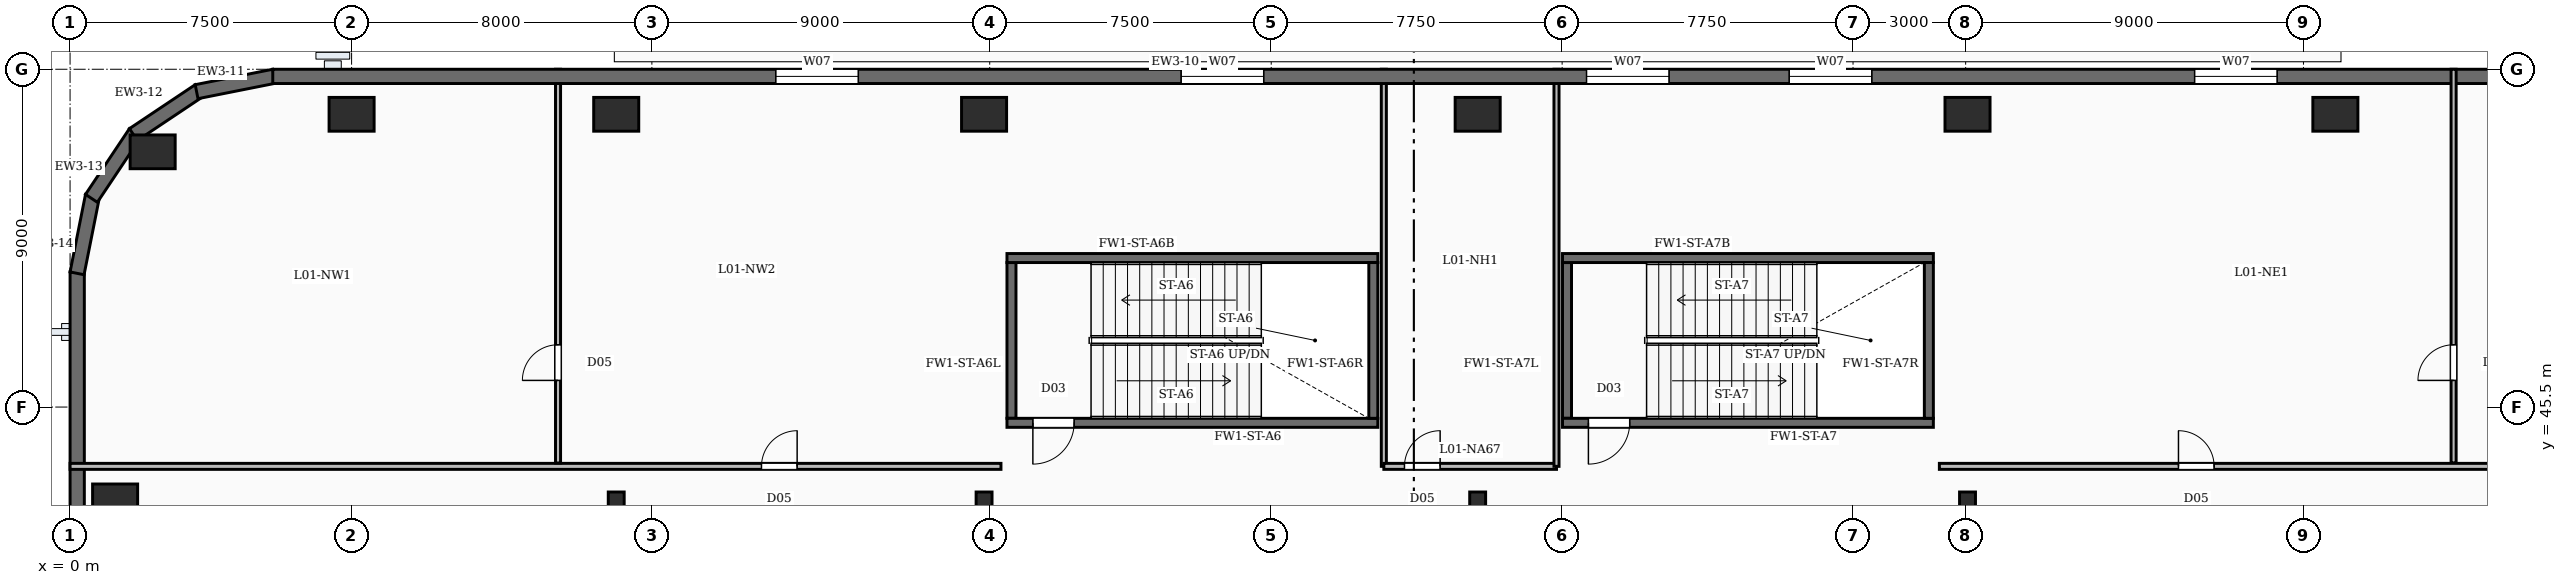
"""IFC4 building model, lengths in metres.
Left out: names, types, materials, properties, quantities, classifications, styles, units other than length and angle.
Written with IfcOpenShell. Run it as: python <this file> out.ifc"""

import sys

from ifc_helpers import new_model, si_unit, direction, frame, frame_2d, origin, origin_2d, place, context, subcontext, project, spatial, rectangle, i_section, extrude, element, fill, save


model = new_model("IFC4")
c1 = context("Model", 3, precision=1e-05, world=origin(), true_north=direction((0.0, 1.0)))
c2 = subcontext(c1, "Body", "Model", "MODEL_VIEW")
j1 = project(units=[si_unit("LENGTHUNIT", "METRE"), si_unit("PLANEANGLEUNIT", "RADIAN")], contexts=[c1])
p1 = place(None, origin())
s1 = spatial("IfcSite", under=j1, at=p1, CompositionType="ELEMENT")
p2 = place(p1, origin())
s2 = spatial("IfcBuilding", under=s1, at=p2, CompositionType="ELEMENT")
p3 = place(p2, frame((0.0, 0.0, 8.0)))
s3 = spatial("IfcBuildingStorey", under=s2, at=p3, CompositionType="ELEMENT", Elevation=8.0)
for number, where, z_axis, x_axis in (
    (1, (60.35, 53.3, -0.35), (0.0, 0.0, 1.0), (1.0, 0.0, 0.0)),
    (2, (50.55, 53.3, -0.35), (0.0, 0.0, 1.0), (1.0, 0.0, 0.0)),
    (3, (37.5, 53.3, -0.35), (0.0, 0.0, 1.0), (1.0, 0.0, 0.0)),
    (4, (24.35, 53.3, -0.35), (0.0, 0.0, 1.0), (1.0, 0.0, 0.0)),
    (5, (14.55, 53.3, -0.35), (0.0, 0.0, 1.0), (1.0, 0.0, 0.0)),
    (6, (7.5, 53.3, -0.35), (0.0, 0.0, 1.0), (1.0, 0.0, 0.0)),
    (7, (2.2, 52.3, -0.35), (0.0, 0.0, 1.0), (1.0, 0.0, 0.0)),
    (8, (1.2, 43.0, -0.35), (0.0, 0.0, 1.0), (1.0, 0.0, 0.0)),
):
    element("IfcColumn", number, at=place(p3, frame(where, z_axis=z_axis, x_axis=x_axis)), inside=s3, PredefinedType="COLUMN", context=c2, shape_type="SweptSolid", body=[
        extrude(rectangle(XDim=1.2, YDim=0.9, at=origin_2d()), origin(), (0.0, 0.0, 1.0), 5.0),
    ])
for number, where, z_axis, x_axis in (
    (9, (14.55, 43.0, -0.35), (0.0, 0.0, 1.0), (1.0, 0.0, 0.0)),
    (10, (24.35, 43.0, -0.35), (0.0, 0.0, 1.0), (1.0, 0.0, 0.0)),
    (11, (37.5, 43.0, -0.35), (0.0, 0.0, 1.0), (1.0, 0.0, 0.0)),
    (12, (50.55, 43.0, -0.35), (0.0, 0.0, 1.0), (1.0, 0.0, 0.0)),
):
    element("IfcColumn", number, at=place(p3, frame(where, z_axis=z_axis, x_axis=x_axis)), inside=s3, PredefinedType="COLUMN", context=c2, shape_type="SweptSolid", body=[
        extrude(i_section(OverallWidth=0.424, OverallDepth=0.474, WebThickness=0.048, FlangeThickness=0.077, FilletRadius=0.02, at=origin_2d()), origin(), (0.0, 0.0, 1.0), 5.0),
    ])
p4 = place(p3, frame((5.4, 54.31, 0.0), z_axis=(0.0, 0.0, 1.0), x_axis=(1.0, 0.0, 0.0)))
e13 = element("IfcWall", 13, at=p4, inside=s3, PredefinedType="SOLIDWALL", context=c2, shape_type="SweptSolid", body=[
    extrude(rectangle(XDim=68.7, YDim=0.38, at=frame_2d((34.35, 0.0))), origin(), (0.0, 0.0, 1.0), 4.65),
])
p5 = place(p4, frame((13.4, 0.0, 0.95)))
e14 = element("IfcOpeningElement", 14, at=p5, cuts=e13, PredefinedType="OPENING", context=c2, shape_type="SweptSolid", body=[
    extrude(rectangle(XDim=2.2, YDim=2.5, at=frame_2d((1.1, 1.25))), frame((0.0, 0.2, 0.0), z_axis=(0.0, -1.0, 0.0), x_axis=(1.0, 0.0, 0.0)), (0.0, 0.0, 1.0), 0.4),
])
p6 = place(p4, frame((24.2, 0.0, 0.95)))
e15 = element("IfcOpeningElement", 15, at=p6, cuts=e13, PredefinedType="OPENING", context=c2, shape_type="SweptSolid", body=[
    extrude(rectangle(XDim=2.2, YDim=2.5, at=frame_2d((1.1, 1.25))), frame((0.0, 0.2, 0.0), z_axis=(0.0, -1.0, 0.0), x_axis=(1.0, 0.0, 0.0)), (0.0, 0.0, 1.0), 0.4),
])
p7 = place(p4, frame((35.0, 0.0, 0.95)))
e16 = element("IfcOpeningElement", 16, at=p7, cuts=e13, PredefinedType="OPENING", context=c2, shape_type="SweptSolid", body=[
    extrude(rectangle(XDim=2.2, YDim=2.5, at=frame_2d((1.1, 1.25))), frame((0.0, 0.2, 0.0), z_axis=(0.0, -1.0, 0.0), x_axis=(1.0, 0.0, 0.0)), (0.0, 0.0, 1.0), 0.4),
])
p8 = place(p4, frame((40.4, 0.0, 0.95)))
e17 = element("IfcOpeningElement", 17, at=p8, cuts=e13, PredefinedType="OPENING", context=c2, shape_type="SweptSolid", body=[
    extrude(rectangle(XDim=2.2, YDim=2.5, at=frame_2d((1.1, 1.25))), frame((0.0, 0.2, 0.0), z_axis=(0.0, -1.0, 0.0), x_axis=(1.0, 0.0, 0.0)), (0.0, 0.0, 1.0), 0.4),
])
p9 = place(p4, frame((51.2, 0.0, 0.95)))
e18 = element("IfcOpeningElement", 18, at=p9, cuts=e13, PredefinedType="OPENING", context=c2, shape_type="SweptSolid", body=[
    extrude(rectangle(XDim=2.2, YDim=2.5, at=frame_2d((1.1, 1.25))), frame((0.0, 0.2, 0.0), z_axis=(0.0, -1.0, 0.0), x_axis=(1.0, 0.0, 0.0)), (0.0, 0.0, 1.0), 0.4),
])
p10 = place(p4, frame((62.0, 0.0, 0.95)))
e19 = element("IfcOpeningElement", 19, at=p10, cuts=e13, PredefinedType="OPENING", context=c2, shape_type="SweptSolid", body=[
    extrude(rectangle(XDim=2.2, YDim=2.5, at=frame_2d((1.1, 1.25))), frame((0.0, 0.2, 0.0), z_axis=(0.0, -1.0, 0.0), x_axis=(1.0, 0.0, 0.0)), (0.0, 0.0, 1.0), 0.4),
])
for number, where, z_axis, x_axis in (
    (20, (3.371, 53.903, 0.0), (0.0, 0.0, 1.0), (0.981, 0.195, 0.0)),
    (21, (1.687, 52.76, 0.0), (0.0, 0.0, 1.0), (0.832, 0.556, 0.0)),
    (22, (0.569, 51.061, 0.0), (0.0, 0.0, 1.0), (0.556, 0.832, 0.0)),
    (23, (0.186, 49.063, 0.0), (0.0, 0.0, 1.0), (0.195, 0.981, 0.0)),
):
    element("IfcWall", number, at=place(p3, frame(where, z_axis=z_axis, x_axis=x_axis)), inside=s3, PredefinedType="SOLIDWALL", context=c2, shape_type="SweptSolid", body=[
        extrude(rectangle(XDim=2.107, YDim=0.38, at=frame_2d((1.053, 0.0))), origin(), (0.0, 0.0, 1.0), 4.65),
    ])
p11 = place(p3, frame((0.19, 5.4, 0.0), z_axis=(0.0, 0.0, 1.0), x_axis=(0.0, 1.0, 0.0)))
e24 = element("IfcWall", 24, at=p11, inside=s3, PredefinedType="SOLIDWALL", context=c2, shape_type="SweptSolid", body=[
    extrude(rectangle(XDim=43.7, YDim=0.38, at=frame_2d((21.85, 0.0))), origin(), (0.0, 0.0, 1.0), 4.65),
])
p12 = place(p11, frame((2.6, 0.0, 0.95)))
e25 = element("IfcOpeningElement", 25, at=p12, cuts=e24, PredefinedType="OPENING", context=c2, shape_type="SweptSolid", body=[
    extrude(rectangle(XDim=2.2, YDim=2.5, at=frame_2d((1.1, 1.25))), frame((0.0, 0.2, 0.0), z_axis=(0.0, -1.0, 0.0), x_axis=(1.0, 0.0, 0.0)), (0.0, 0.0, 1.0), 0.4),
])
p13 = place(p11, frame((8.0, 0.0, 0.95)))
e26 = element("IfcOpeningElement", 26, at=p13, cuts=e24, PredefinedType="OPENING", context=c2, shape_type="SweptSolid", body=[
    extrude(rectangle(XDim=2.2, YDim=2.5, at=frame_2d((1.1, 1.25))), frame((0.0, 0.2, 0.0), z_axis=(0.0, -1.0, 0.0), x_axis=(1.0, 0.0, 0.0)), (0.0, 0.0, 1.0), 0.4),
])
p14 = place(p11, frame((24.2, 0.0, 0.95)))
e27 = element("IfcOpeningElement", 27, at=p14, cuts=e24, PredefinedType="OPENING", context=c2, shape_type="SweptSolid", body=[
    extrude(rectangle(XDim=2.2, YDim=2.5, at=frame_2d((1.1, 1.25))), frame((0.0, 0.2, 0.0), z_axis=(0.0, -1.0, 0.0), x_axis=(1.0, 0.0, 0.0)), (0.0, 0.0, 1.0), 0.4),
])
p15 = place(p11, frame((29.6, 0.0, 0.95)))
e28 = element("IfcOpeningElement", 28, at=p15, cuts=e24, PredefinedType="OPENING", context=c2, shape_type="SweptSolid", body=[
    extrude(rectangle(XDim=2.2, YDim=2.5, at=frame_2d((1.1, 1.25))), frame((0.0, 0.2, 0.0), z_axis=(0.0, -1.0, 0.0), x_axis=(1.0, 0.0, 0.0)), (0.0, 0.0, 1.0), 0.4),
])
p16 = place(p3, frame((34.84, 45.08, 0.0), z_axis=(0.0, 0.0, 1.0), x_axis=(-1.0, 0.0, 0.0)))
e29 = element("IfcWall", 29, at=p16, inside=s3, PredefinedType="SOLIDWALL", context=c2, shape_type="SweptSolid", body=[
    extrude(rectangle(XDim=9.88, YDim=0.24, at=frame_2d((4.94, 0.0))), origin(), (0.0, 0.0, 1.0), 4.65),
])
p17 = place(p16, frame((8.09, 0.0, 0.0)))
e30 = element("IfcOpeningElement", 30, at=p17, cuts=e29, PredefinedType="OPENING", context=c2, shape_type="SweptSolid", body=[
    extrude(rectangle(XDim=1.1, YDim=2.15, at=frame_2d((0.55, 1.075))), frame((0.0, 0.13, 0.0), z_axis=(0.0, -1.0, 0.0), x_axis=(1.0, 0.0, 0.0)), (0.0, 0.0, 1.0), 0.26),
])
p18 = place(p3, frame((24.96, 49.47, 0.0), z_axis=(0.0, 0.0, 1.0), x_axis=(1.0, 0.0, 0.0)))
e31 = element("IfcWall", 31, at=p18, inside=s3, PredefinedType="SOLIDWALL", context=c2, shape_type="SweptSolid", body=[
    extrude(rectangle(XDim=9.88, YDim=0.24, at=frame_2d((4.94, 0.0))), origin(), (0.0, 0.0, 1.0), 4.65),
])
for number, where, z_axis, x_axis in (
    (32, (25.08, 45.2, 0.0), (0.0, 0.0, 1.0), (0.0, 1.0, 0.0)),
    (33, (34.72, 45.2, 0.0), (0.0, 0.0, 1.0), (0.0, 1.0, 0.0)),
):
    element("IfcWall", number, at=place(p3, frame(where, z_axis=z_axis, x_axis=x_axis)), inside=s3, PredefinedType="SOLIDWALL", context=c2, shape_type="SweptSolid", body=[
        extrude(rectangle(XDim=4.15, YDim=0.24, at=frame_2d((2.075, 0.0))), origin(), (0.0, 0.0, 1.0), 4.65),
    ])
p19 = place(p3, frame((49.64, 45.08, 0.0), z_axis=(0.0, 0.0, 1.0), x_axis=(-1.0, 0.0, 0.0)))
e34 = element("IfcWall", 34, at=p19, inside=s3, PredefinedType="SOLIDWALL", context=c2, shape_type="SweptSolid", body=[
    extrude(rectangle(XDim=9.88, YDim=0.24, at=frame_2d((4.94, 0.0))), origin(), (0.0, 0.0, 1.0), 4.65),
])
p20 = place(p19, frame((8.09, 0.0, 0.0)))
e35 = element("IfcOpeningElement", 35, at=p20, cuts=e34, PredefinedType="OPENING", context=c2, shape_type="SweptSolid", body=[
    extrude(rectangle(XDim=1.1, YDim=2.15, at=frame_2d((0.55, 1.075))), frame((0.0, 0.13, 0.0), z_axis=(0.0, -1.0, 0.0), x_axis=(1.0, 0.0, 0.0)), (0.0, 0.0, 1.0), 0.26),
])
p21 = place(p3, frame((39.76, 49.47, 0.0), z_axis=(0.0, 0.0, 1.0), x_axis=(1.0, 0.0, 0.0)))
e36 = element("IfcWall", 36, at=p21, inside=s3, PredefinedType="SOLIDWALL", context=c2, shape_type="SweptSolid", body=[
    extrude(rectangle(XDim=9.88, YDim=0.24, at=frame_2d((4.94, 0.0))), origin(), (0.0, 0.0, 1.0), 4.65),
])
for number, where, z_axis, x_axis in (
    (37, (39.88, 45.2, 0.0), (0.0, 0.0, 1.0), (0.0, 1.0, 0.0)),
    (38, (49.52, 45.2, 0.0), (0.0, 0.0, 1.0), (0.0, 1.0, 0.0)),
):
    element("IfcWall", number, at=place(p3, frame(where, z_axis=z_axis, x_axis=x_axis)), inside=s3, PredefinedType="SOLIDWALL", context=c2, shape_type="SweptSolid", body=[
        extrude(rectangle(XDim=4.15, YDim=0.24, at=frame_2d((2.075, 0.0))), origin(), (0.0, 0.0, 1.0), 4.65),
    ])
p22 = place(p3, frame((13.0, 44.01, 0.0), z_axis=(0.0, 0.0, 1.0), x_axis=(0.0, 1.0, 0.0)))
e39 = element("IfcWall", 39, at=p22, inside=s3, PredefinedType="PARTITIONING", context=c2, shape_type="SweptSolid", body=[
    extrude(rectangle(XDim=10.49, YDim=0.135, at=frame_2d((5.245, 0.0))), origin(), (0.0, 0.0, 1.0), 3.71),
])
p23 = place(p22, frame((2.2, 0.0, 0.0)))
e40 = element("IfcOpeningElement", 40, at=p23, cuts=e39, PredefinedType="OPENING", context=c2, shape_type="SweptSolid", body=[
    extrude(rectangle(XDim=0.95, YDim=2.15, at=frame_2d((0.475, 1.075))), frame((0.0, 0.077, 0.0), z_axis=(0.0, -1.0, 0.0), x_axis=(1.0, 0.0, 0.0)), (0.0, 0.0, 1.0), 0.155),
])
p24 = place(p3, frame((0.0, 43.92, 0.0), z_axis=(0.0, 0.0, 1.0), x_axis=(1.0, 0.0, 0.0)))
e41 = element("IfcWall", 41, at=p24, inside=s3, PredefinedType="PARTITIONING", context=c2, shape_type="SweptSolid", body=[
    extrude(rectangle(XDim=24.8, YDim=0.16, at=frame_2d((12.4, 0.0))), origin(), (0.0, 0.0, 1.0), 3.71),
])
p25 = place(p24, frame((18.42, 0.0, 0.0)))
e42 = element("IfcOpeningElement", 42, at=p25, cuts=e41, PredefinedType="OPENING", context=c2, shape_type="SweptSolid", body=[
    extrude(rectangle(XDim=0.95, YDim=2.15, at=frame_2d((0.475, 1.075))), frame((0.0, 0.09, 0.0), z_axis=(0.0, -1.0, 0.0), x_axis=(1.0, 0.0, 0.0)), (0.0, 0.0, 1.0), 0.18),
])
p26 = place(p3, frame((63.5, 44.01, 0.0), z_axis=(0.0, 0.0, 1.0), x_axis=(0.0, 1.0, 0.0)))
e43 = element("IfcWall", 43, at=p26, inside=s3, PredefinedType="PARTITIONING", context=c2, shape_type="SweptSolid", body=[
    extrude(rectangle(XDim=10.49, YDim=0.135, at=frame_2d((5.245, 0.0))), origin(), (0.0, 0.0, 1.0), 3.71),
])
p27 = place(p26, frame((2.2, 0.0, 0.0)))
e44 = element("IfcOpeningElement", 44, at=p27, cuts=e43, PredefinedType="OPENING", context=c2, shape_type="SweptSolid", body=[
    extrude(rectangle(XDim=0.95, YDim=2.15, at=frame_2d((0.475, 1.075))), frame((0.0, 0.077, 0.0), z_axis=(0.0, -1.0, 0.0), x_axis=(1.0, 0.0, 0.0)), (0.0, 0.0, 1.0), 0.155),
])
p28 = place(p3, frame((49.8, 43.92, 0.0), z_axis=(0.0, 0.0, 1.0), x_axis=(1.0, 0.0, 0.0)))
e45 = element("IfcWall", 45, at=p28, inside=s3, PredefinedType="PARTITIONING", context=c2, shape_type="SweptSolid", body=[
    extrude(rectangle(XDim=29.7, YDim=0.16, at=frame_2d((14.85, 0.0))), origin(), (0.0, 0.0, 1.0), 3.71),
])
p29 = place(p28, frame((6.37, 0.0, 0.0)))
e46 = element("IfcOpeningElement", 46, at=p29, cuts=e45, PredefinedType="OPENING", context=c2, shape_type="SweptSolid", body=[
    extrude(rectangle(XDim=0.95, YDim=2.15, at=frame_2d((0.475, 1.075))), frame((0.0, 0.09, 0.0), z_axis=(0.0, -1.0, 0.0), x_axis=(1.0, 0.0, 0.0)), (0.0, 0.0, 1.0), 0.18),
])
p30 = place(p28, frame((18.02, 0.0, 0.0)))
e47 = element("IfcOpeningElement", 47, at=p30, cuts=e45, PredefinedType="OPENING", context=c2, shape_type="SweptSolid", body=[
    extrude(rectangle(XDim=0.95, YDim=2.15, at=frame_2d((0.475, 1.075))), frame((0.0, 0.09, 0.0), z_axis=(0.0, -1.0, 0.0), x_axis=(1.0, 0.0, 0.0)), (0.0, 0.0, 1.0), 0.18),
])
p31 = place(p3, frame((35.0, 43.92, 0.0), z_axis=(0.0, 0.0, 1.0), x_axis=(1.0, 0.0, 0.0)))
e48 = element("IfcWall", 48, at=p31, inside=s3, PredefinedType="PARTITIONING", context=c2, shape_type="SweptSolid", body=[
    extrude(rectangle(XDim=4.6, YDim=0.16, at=frame_2d((2.3, 0.0))), origin(), (0.0, 0.0, 1.0), 3.71),
])
p32 = place(p31, frame((0.55, 0.0, 0.0)))
e49 = element("IfcOpeningElement", 49, at=p32, cuts=e48, PredefinedType="OPENING", context=c2, shape_type="SweptSolid", body=[
    extrude(rectangle(XDim=0.95, YDim=2.15, at=frame_2d((0.475, 1.075))), frame((0.0, 0.09, 0.0), z_axis=(0.0, -1.0, 0.0), x_axis=(1.0, 0.0, 0.0)), (0.0, 0.0, 1.0), 0.18),
])
for number, where, z_axis, x_axis in (
    (50, (35.0, 43.92, 0.0), (0.0, 0.0, 1.0), (0.0, 1.0, 0.0)),
    (51, (39.6, 43.92, 0.0), (0.0, 0.0, 1.0), (0.0, 1.0, 0.0)),
):
    element("IfcWall", number, at=place(p3, frame(where, z_axis=z_axis, x_axis=x_axis)), inside=s3, PredefinedType="PARTITIONING", context=c2, shape_type="SweptSolid", body=[
        extrude(rectangle(XDim=10.58, YDim=0.135, at=frame_2d((5.29, 0.0))), origin(), (0.0, 0.0, 1.0), 3.71),
    ])
p33 = place(p5, origin())
e52 = element("IfcWindow", 52, at=p33, inside=s3, PartitioningType="DOUBLE_PANEL_VERTICAL", PredefinedType="WINDOW", context=c2, shape_type="SweptSolid", body=[
    extrude(rectangle(XDim=2.2, YDim=2.5, at=frame_2d((1.1, 1.25))), frame((0.0, 0.03, 0.0), z_axis=(0.0, -1.0, 0.0), x_axis=(1.0, 0.0, 0.0)), (0.0, 0.0, 1.0), 0.06),
])
fill(e14, e52)
p34 = place(p6, origin())
e53 = element("IfcWindow", 53, at=p34, inside=s3, PartitioningType="DOUBLE_PANEL_VERTICAL", PredefinedType="WINDOW", context=c2, shape_type="SweptSolid", body=[
    extrude(rectangle(XDim=2.2, YDim=2.5, at=frame_2d((1.1, 1.25))), frame((0.0, 0.03, 0.0), z_axis=(0.0, -1.0, 0.0), x_axis=(1.0, 0.0, 0.0)), (0.0, 0.0, 1.0), 0.06),
])
fill(e15, e53)
p35 = place(p7, origin())
e54 = element("IfcWindow", 54, at=p35, inside=s3, PartitioningType="DOUBLE_PANEL_VERTICAL", PredefinedType="WINDOW", context=c2, shape_type="SweptSolid", body=[
    extrude(rectangle(XDim=2.2, YDim=2.5, at=frame_2d((1.1, 1.25))), frame((0.0, 0.03, 0.0), z_axis=(0.0, -1.0, 0.0), x_axis=(1.0, 0.0, 0.0)), (0.0, 0.0, 1.0), 0.06),
])
fill(e16, e54)
p36 = place(p8, origin())
e55 = element("IfcWindow", 55, at=p36, inside=s3, PartitioningType="DOUBLE_PANEL_VERTICAL", PredefinedType="WINDOW", context=c2, shape_type="SweptSolid", body=[
    extrude(rectangle(XDim=2.2, YDim=2.5, at=frame_2d((1.1, 1.25))), frame((0.0, 0.03, 0.0), z_axis=(0.0, -1.0, 0.0), x_axis=(1.0, 0.0, 0.0)), (0.0, 0.0, 1.0), 0.06),
])
fill(e17, e55)
p37 = place(p9, origin())
e56 = element("IfcWindow", 56, at=p37, inside=s3, PartitioningType="DOUBLE_PANEL_VERTICAL", PredefinedType="WINDOW", context=c2, shape_type="SweptSolid", body=[
    extrude(rectangle(XDim=2.2, YDim=2.5, at=frame_2d((1.1, 1.25))), frame((0.0, 0.03, 0.0), z_axis=(0.0, -1.0, 0.0), x_axis=(1.0, 0.0, 0.0)), (0.0, 0.0, 1.0), 0.06),
])
fill(e18, e56)
p38 = place(p17, origin())
e57 = element("IfcDoor", 57, at=p38, inside=s3, OperationType="SINGLE_SWING_RIGHT", PredefinedType="DOOR", context=c2, shape_type="SweptSolid", body=[
    extrude(rectangle(XDim=1.1, YDim=2.15, at=frame_2d((0.55, 1.075))), frame((0.0, 0.025, 0.0), z_axis=(0.0, -1.0, 0.0), x_axis=(1.0, 0.0, 0.0)), (0.0, 0.0, 1.0), 0.05),
])
fill(e30, e57)
p39 = place(p20, origin())
e58 = element("IfcDoor", 58, at=p39, inside=s3, OperationType="SINGLE_SWING_RIGHT", PredefinedType="DOOR", context=c2, shape_type="SweptSolid", body=[
    extrude(rectangle(XDim=1.1, YDim=2.15, at=frame_2d((0.55, 1.075))), frame((0.0, 0.025, 0.0), z_axis=(0.0, -1.0, 0.0), x_axis=(1.0, 0.0, 0.0)), (0.0, 0.0, 1.0), 0.05),
])
fill(e35, e58)
p40 = place(p23, origin())
e59 = element("IfcDoor", 59, at=p40, inside=s3, OperationType="SINGLE_SWING_LEFT", PredefinedType="DOOR", context=c2, shape_type="SweptSolid", body=[
    extrude(rectangle(XDim=0.95, YDim=2.15, at=frame_2d((0.475, 1.075))), frame((0.0, 0.025, 0.0), z_axis=(0.0, -1.0, 0.0), x_axis=(1.0, 0.0, 0.0)), (0.0, 0.0, 1.0), 0.05),
])
fill(e40, e59)
p41 = place(p25, origin())
e60 = element("IfcDoor", 60, at=p41, inside=s3, OperationType="SINGLE_SWING_RIGHT", PredefinedType="DOOR", context=c2, shape_type="SweptSolid", body=[
    extrude(rectangle(XDim=0.95, YDim=2.15, at=frame_2d((0.475, 1.075))), frame((0.0, 0.025, 0.0), z_axis=(0.0, -1.0, 0.0), x_axis=(1.0, 0.0, 0.0)), (0.0, 0.0, 1.0), 0.05),
])
fill(e42, e60)
p42 = place(p27, origin())
e61 = element("IfcDoor", 61, at=p42, inside=s3, OperationType="SINGLE_SWING_LEFT", PredefinedType="DOOR", context=c2, shape_type="SweptSolid", body=[
    extrude(rectangle(XDim=0.95, YDim=2.15, at=frame_2d((0.475, 1.075))), frame((0.0, 0.025, 0.0), z_axis=(0.0, -1.0, 0.0), x_axis=(1.0, 0.0, 0.0)), (0.0, 0.0, 1.0), 0.05),
])
fill(e44, e61)
p43 = place(p29, origin())
e62 = element("IfcDoor", 62, at=p43, inside=s3, OperationType="SINGLE_SWING_LEFT", PredefinedType="DOOR", context=c2, shape_type="SweptSolid", body=[
    extrude(rectangle(XDim=0.95, YDim=2.15, at=frame_2d((0.475, 1.075))), frame((0.0, 0.025, 0.0), z_axis=(0.0, -1.0, 0.0), x_axis=(1.0, 0.0, 0.0)), (0.0, 0.0, 1.0), 0.05),
])
fill(e46, e62)
p44 = place(p32, origin())
e63 = element("IfcDoor", 63, at=p44, inside=s3, OperationType="SINGLE_SWING_RIGHT", PredefinedType="DOOR", context=c2, shape_type="SweptSolid", body=[
    extrude(rectangle(XDim=0.95, YDim=2.15, at=frame_2d((0.475, 1.075))), frame((0.0, 0.025, 0.0), z_axis=(0.0, -1.0, 0.0), x_axis=(1.0, 0.0, 0.0)), (0.0, 0.0, 1.0), 0.05),
])
fill(e49, e63)
save(model, sys.argv[1])
